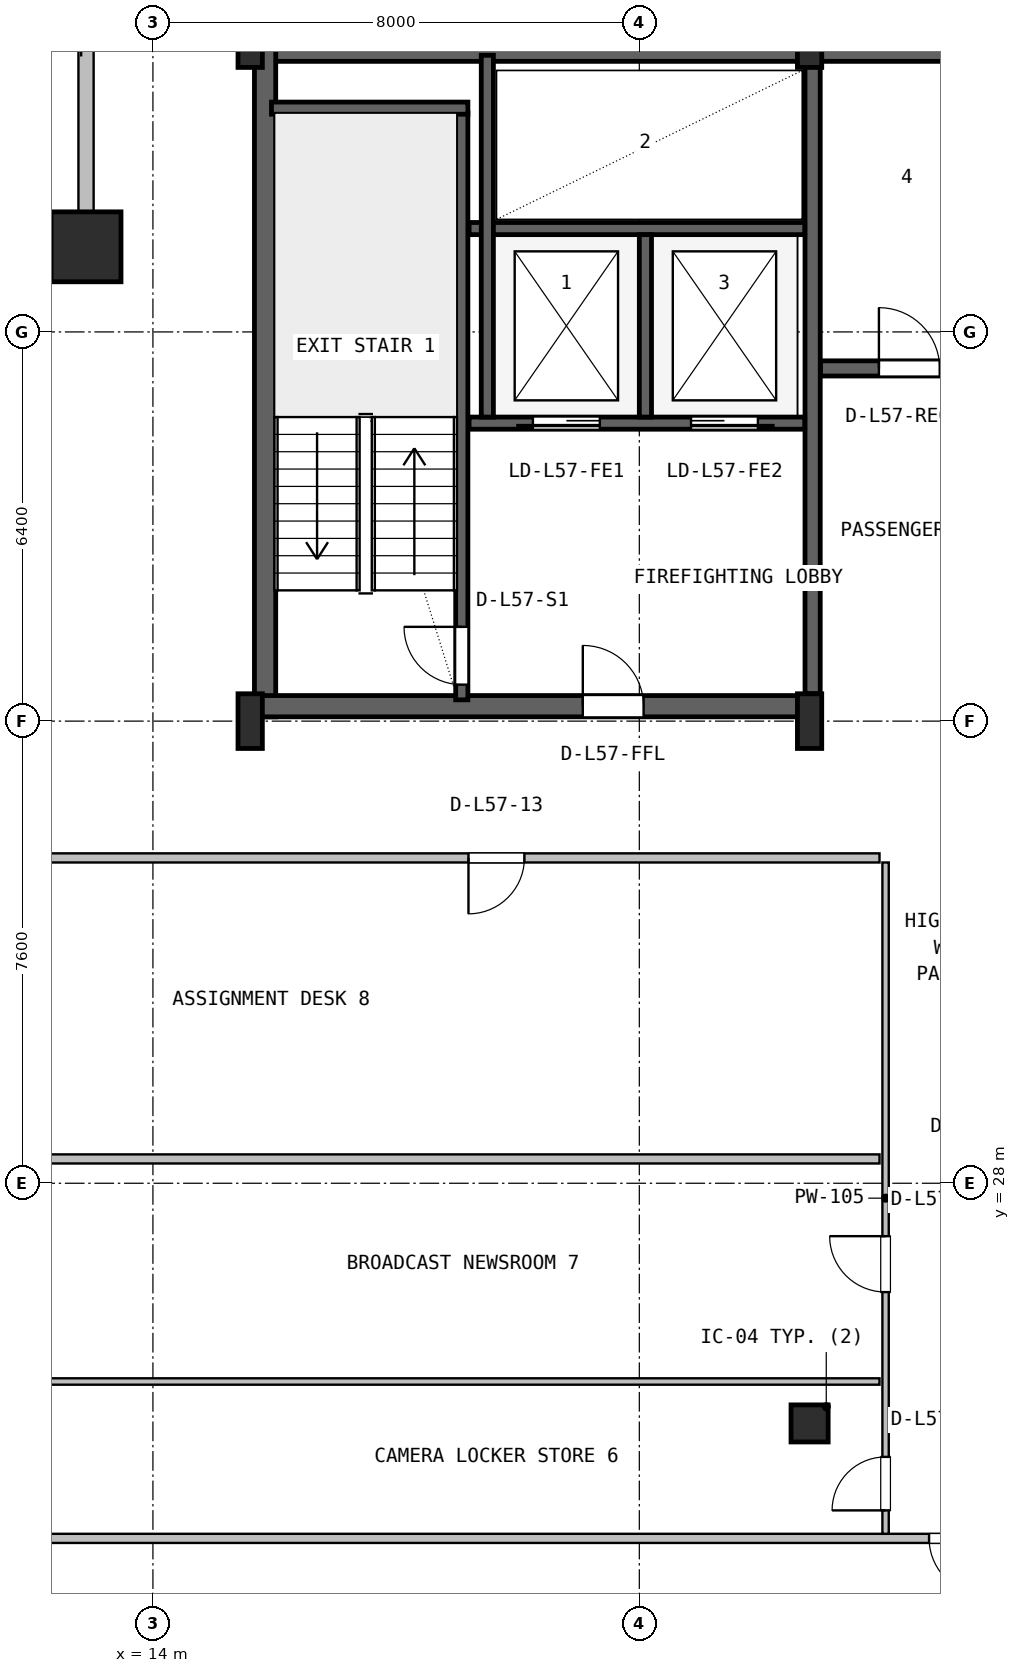
"""IFC4 building model, lengths in metres.
Left out: names, types, materials, properties, quantities, classifications, styles, units other than length and angle.
Written with IfcOpenShell. Run it as: python <this file> out.ifc"""

import sys

from ifc_helpers import new_model, si_unit, direction, frame, frame_2d, origin, origin_2d, place, context, subcontext, project, spatial, rectangle, hollow_rectangle, hollow_circle, i_section, extrude, source, transform, mapped, element, fill, save


model = new_model("IFC4")
c1 = context("Model", 3, precision=1e-05, world=origin(), true_north=direction((0.0, 1.0)))
c2 = subcontext(c1, "Body", "Model", "MODEL_VIEW")
j1 = project(units=[si_unit("LENGTHUNIT", "METRE"), si_unit("PLANEANGLEUNIT", "RADIAN")], contexts=[c1])
p1 = place(None, origin())
s1 = spatial("IfcSite", under=j1, at=p1, CompositionType="ELEMENT")
p2 = place(p1, origin())
s2 = spatial("IfcBuilding", under=s1, at=p2, CompositionType="ELEMENT")
p3 = place(p2, frame((0.0, 0.0, 230.2)))
s3 = spatial("IfcBuildingStorey", under=s2, at=p3, CompositionType="ELEMENT", Elevation=230.2)
p4 = place(p3, frame((15.6, 46.625, 0.0), z_axis=(0.0, 0.0, 1.0), x_axis=(1.0, 0.0, 0.0)))
e1 = element("IfcWall", 1, at=p4, inside=s3, PredefinedType="SHEAR", context=c2, shape_type="SweptSolid", body=[
    extrude(rectangle(XDim=36.8, YDim=0.35, at=frame_2d((18.4, 0.0))), origin(), (0.0, 0.0, 1.0), 3.48),
])
p5 = place(p3, frame((15.845, 35.67, 0.0), z_axis=(0.0, 0.0, 1.0), x_axis=(0.0, 1.0, 0.0)))
e2 = element("IfcWall", 2, at=p5, inside=s3, PredefinedType="SHEAR", context=c2, shape_type="SweptSolid", body=[
    extrude(rectangle(XDim=11.13, YDim=0.35, at=frame_2d((5.565, 0.0))), origin(), (0.0, 0.0, 1.0), 3.48),
])
p6 = place(p3, frame((15.67, 35.845, 0.0), z_axis=(0.0, 0.0, 1.0), x_axis=(1.0, 0.0, 0.0)))
e3 = element("IfcWall", 3, at=p6, inside=s3, PredefinedType="SHEAR", context=c2, shape_type="SweptSolid", body=[
    extrude(rectangle(XDim=9.13, YDim=0.35, at=frame_2d((4.565, 0.0))), origin(), (0.0, 0.0, 1.0), 3.48),
])
p7 = place(p6, frame((5.4, 0.0, 0.0)))
e4 = element("IfcOpeningElement", 4, at=p7, cuts=e3, PredefinedType="OPENING", context=c2, shape_type="SweptSolid", body=[
    extrude(rectangle(XDim=1.0, YDim=2.1, at=frame_2d((0.5, 1.05))), frame((0.0, 0.185, 0.0), z_axis=(0.0, -1.0, 0.0), x_axis=(1.0, 0.0, 0.0)), (0.0, 0.0, 1.0), 0.37),
])
m1 = source(origin(), c2, "Body", "SweptSolid", [
    extrude(i_section(OverallWidth=0.4, OverallDepth=0.9, WebThickness=0.016, FlangeThickness=0.028, FilletRadius=0.016, at=origin_2d()), origin(), (0.0, 0.0, 1.0), 3.8),
])
for number, where, z_axis, x_axis in (
    (5, (15.6, 35.6, 0.0), (0.0, 0.0, 1.0), (1.0, 0.0, 0.0)),
    (6, (15.6, 46.8, 0.0), (0.0, 0.0, 1.0), (1.0, 0.0, 0.0)),
    (7, (24.8, 35.6, 0.0), (0.0, 0.0, 1.0), (1.0, 0.0, 0.0)),
    (8, (24.8, 46.8, 0.0), (0.0, 0.0, 1.0), (1.0, 0.0, 0.0)),
):
    element("IfcColumn", number, at=place(p3, frame(where, z_axis=z_axis, x_axis=x_axis)), inside=s3, PredefinedType="COLUMN", context=c2, shape_type="MappedRepresentation", body=[
        mapped(m1, transform((0.0, 0.0, 0.0), x_axis=(1.0, 0.0, 0.0), y_axis=(0.0, 1.0, 0.0), z_axis=(0.0, 0.0, 1.0), scale=1.0)),
    ])
m2 = source(origin(), c2, "Body", "SweptSolid", [
    extrude(hollow_rectangle(XDim=1.15, YDim=1.15, WallThickness=0.045, at=origin_2d()), origin(), (0.0, 0.0, 1.0), 3.8),
])
p8 = place(p3, frame((12.9, 43.4, 0.0), z_axis=(0.0, 0.0, 1.0), x_axis=(1.0, 0.0, 0.0)))
e9 = element("IfcColumn", 9, at=p8, inside=s3, PredefinedType="COLUMN", context=c2, shape_type="MappedRepresentation", body=[
    mapped(m2, transform((0.0, 0.0, 0.0), x_axis=(1.0, 0.0, 0.0), y_axis=(0.0, 1.0, 0.0), z_axis=(0.0, 0.0, 1.0), scale=1.0)),
])
m3 = source(origin(), c2, "Body", "SweptSolid", [
    extrude(hollow_circle(Radius=0.305, WallThickness=0.025, at=origin_2d()), origin(), (0.0, 0.0, 1.0), 3.8),
])
p9 = place(p3, frame((24.8, 24.05, 0.0), z_axis=(0.0, 0.0, 1.0), x_axis=(1.0, 0.0, 0.0)))
e10 = element("IfcColumn", 10, at=p9, inside=s3, PredefinedType="COLUMN", context=c2, shape_type="MappedRepresentation", body=[
    mapped(m3, transform((0.0, 0.0, 0.0), x_axis=(1.0, 0.0, 0.0), y_axis=(0.0, 1.0, 0.0), z_axis=(0.0, 0.0, 1.0), scale=1.0)),
])
p10 = place(p3, frame((9.58, 43.4, 0.0), z_axis=(0.0, 0.0, 1.0), x_axis=(1.0, 0.0, 0.0)))
e11 = element("IfcWall", 11, at=p10, inside=s3, PredefinedType="SOLIDWALL", context=c2, shape_type="SweptSolid", body=[
    extrude(rectangle(XDim=3.19, YDim=0.25, at=frame_2d((1.595, 0.0))), origin(), (0.0, 0.0, 1.0), 3.46),
])
p11 = place(p3, frame((12.9, 43.32, 0.0), z_axis=(0.0, 0.0, 1.0), x_axis=(0.0, 1.0, 0.0)))
e12 = element("IfcWall", 12, at=p11, inside=s3, PredefinedType="SOLIDWALL", context=c2, shape_type="SweptSolid", body=[
    extrude(rectangle(XDim=3.4, YDim=0.25, at=frame_2d((1.7, 0.0))), origin(), (0.0, 0.0, 1.0), 3.101),
])
p12 = place(p3, frame((19.08, 35.95, 0.0), z_axis=(0.0, 0.0, 1.0), x_axis=(0.0, 1.0, 0.0)))
e13 = element("IfcWall", 13, at=p12, inside=s3, PredefinedType="SHEAR", context=c2, shape_type="SweptSolid", body=[
    extrude(rectangle(XDim=9.65, YDim=0.2, at=frame_2d((4.825, 0.0))), origin(), (0.0, 0.0, 1.0), 3.48),
])
p13 = place(p12, frame((0.25, 0.0, 0.0)))
e14 = element("IfcOpeningElement", 14, at=p13, cuts=e13, PredefinedType="OPENING", context=c2, shape_type="SweptSolid", body=[
    extrude(rectangle(XDim=0.95, YDim=2.1, at=frame_2d((0.475, 1.05))), frame((0.0, 0.11, 0.0), z_axis=(0.0, -1.0, 0.0), x_axis=(1.0, 0.0, 0.0)), (0.0, 0.0, 1.0), 0.22),
])
p14 = place(p3, frame((15.95, 45.68, 0.0), z_axis=(0.0, 0.0, 1.0), x_axis=(1.0, 0.0, 0.0)))
e15 = element("IfcWall", 15, at=p14, inside=s3, PredefinedType="SHEAR", context=c2, shape_type="SweptSolid", body=[
    extrude(rectangle(XDim=3.23, YDim=0.2, at=frame_2d((1.615, 0.0))), origin(), (0.0, 0.0, 1.0), 3.48),
])
p15 = place(p3, frame((24.85, 36.05, 0.0), z_axis=(0.0, 0.0, 1.0), x_axis=(0.0, 1.0, 0.0)))
e16 = element("IfcWall", 16, at=p15, inside=s3, PredefinedType="SHEAR", context=c2, shape_type="SweptSolid", body=[
    extrude(rectangle(XDim=10.45, YDim=0.25, at=frame_2d((5.225, 0.0))), origin(), (0.0, 0.0, 1.0), 3.48),
])
p16 = place(p3, frame((19.2, 40.5, 0.0), z_axis=(0.0, 0.0, 1.0), x_axis=(1.0, 0.0, 0.0)))
e17 = element("IfcWall", 17, at=p16, inside=s3, PredefinedType="SHEAR", context=c2, shape_type="SweptSolid", body=[
    extrude(rectangle(XDim=5.52, YDim=0.2, at=frame_2d((2.76, 0.0))), origin(), (0.0, 0.0, 1.0), 3.48),
])
p17 = place(p16, frame((1.05, 0.0, 0.0)))
e18 = element("IfcOpeningElement", 18, at=p17, cuts=e17, PredefinedType="OPENING", context=c2, shape_type="SweptSolid", body=[
    extrude(rectangle(XDim=1.1, YDim=2.18, at=frame_2d((0.55, 1.09))), frame((0.0, 0.11, 0.0), z_axis=(0.0, -1.0, 0.0), x_axis=(1.0, 0.0, 0.0)), (0.0, 0.0, 1.0), 0.22),
])
p18 = place(p16, frame((3.65, 0.0, 0.0)))
e19 = element("IfcOpeningElement", 19, at=p18, cuts=e17, PredefinedType="OPENING", context=c2, shape_type="SweptSolid", body=[
    extrude(rectangle(XDim=1.1, YDim=2.18, at=frame_2d((0.55, 1.09))), frame((0.0, 0.11, 0.0), z_axis=(0.0, -1.0, 0.0), x_axis=(1.0, 0.0, 0.0)), (0.0, 0.0, 1.0), 0.22),
])
p19 = place(p3, frame((19.2, 43.7, 0.0), z_axis=(0.0, 0.0, 1.0), x_axis=(1.0, 0.0, 0.0)))
e20 = element("IfcWall", 20, at=p19, inside=s3, PredefinedType="SHEAR", context=c2, shape_type="SweptSolid", body=[
    extrude(rectangle(XDim=5.52, YDim=0.2, at=frame_2d((2.76, 0.0))), origin(), (0.0, 0.0, 1.0), 3.48),
])
p20 = place(p3, frame((22.1, 40.6, 0.0), z_axis=(0.0, 0.0, 1.0), x_axis=(0.0, 1.0, 0.0)))
e21 = element("IfcWall", 21, at=p20, inside=s3, PredefinedType="SHEAR", context=c2, shape_type="SweptSolid", body=[
    extrude(rectangle(XDim=3.0, YDim=0.2, at=frame_2d((1.5, 0.0))), origin(), (0.0, 0.0, 1.0), 3.48),
])
p21 = place(p3, frame((19.5, 40.6, 0.0), z_axis=(0.0, 0.0, 1.0), x_axis=(0.0, 1.0, 0.0)))
e22 = element("IfcWall", 22, at=p21, inside=s3, PredefinedType="SHEAR", context=c2, shape_type="SweptSolid", body=[
    extrude(rectangle(XDim=5.95, YDim=0.2, at=frame_2d((2.975, 0.0))), origin(), (0.0, 0.0, 1.0), 3.48),
])
p22 = place(p3, frame((24.98, 41.4, 0.0), z_axis=(0.0, 0.0, 1.0), x_axis=(1.0, 0.0, 0.0)))
e23 = element("IfcWall", 23, at=p22, inside=s3, PredefinedType="SHEAR", context=c2, shape_type="SweptSolid", body=[
    extrude(rectangle(XDim=23.82, YDim=0.25, at=frame_2d((11.91, 0.0))), origin(), (0.0, 0.0, 1.0), 3.48),
])
p23 = place(p22, frame((16.87, 0.0, 0.0)))
e24 = element("IfcOpeningElement", 24, at=p23, cuts=e23, PredefinedType="OPENING", context=c2, shape_type="SweptSolid", body=[
    extrude(rectangle(XDim=1.1, YDim=2.18, at=frame_2d((0.55, 1.09))), frame((0.0, 0.135, 0.0), z_axis=(0.0, -1.0, 0.0), x_axis=(1.0, 0.0, 0.0)), (0.0, 0.0, 1.0), 0.27),
])
p24 = place(p22, frame((19.47, 0.0, 0.0)))
e25 = element("IfcOpeningElement", 25, at=p24, cuts=e23, PredefinedType="OPENING", context=c2, shape_type="SweptSolid", body=[
    extrude(rectangle(XDim=1.1, YDim=2.18, at=frame_2d((0.55, 1.09))), frame((0.0, 0.135, 0.0), z_axis=(0.0, -1.0, 0.0), x_axis=(1.0, 0.0, 0.0)), (0.0, 0.0, 1.0), 0.27),
])
p25 = place(p22, frame((22.07, 0.0, 0.0)))
e26 = element("IfcOpeningElement", 26, at=p25, cuts=e23, PredefinedType="OPENING", context=c2, shape_type="SweptSolid", body=[
    extrude(rectangle(XDim=1.1, YDim=2.18, at=frame_2d((0.55, 1.09))), frame((0.0, 0.135, 0.0), z_axis=(0.0, -1.0, 0.0), x_axis=(1.0, 0.0, 0.0)), (0.0, 0.0, 1.0), 0.27),
])
p26 = place(p22, frame((0.96, 0.0, 0.0)))
e27 = element("IfcOpeningElement", 27, at=p26, cuts=e23, PredefinedType="OPENING", context=c2, shape_type="SweptSolid", body=[
    extrude(rectangle(XDim=1.0, YDim=2.08, at=frame_2d((0.5, 1.04))), frame((0.0, 0.135, 0.0), z_axis=(0.0, -1.0, 0.0), x_axis=(1.0, 0.0, 0.0)), (0.0, 0.0, 1.0), 0.27),
])
p27 = place(p22, frame((3.56, 0.0, 0.0)))
e28 = element("IfcOpeningElement", 28, at=p27, cuts=e23, PredefinedType="OPENING", context=c2, shape_type="SweptSolid", body=[
    extrude(rectangle(XDim=1.0, YDim=2.08, at=frame_2d((0.5, 1.04))), frame((0.0, 0.135, 0.0), z_axis=(0.0, -1.0, 0.0), x_axis=(1.0, 0.0, 0.0)), (0.0, 0.0, 1.0), 0.27),
])
p28 = place(p22, frame((6.16, 0.0, 0.0)))
e29 = element("IfcOpeningElement", 29, at=p28, cuts=e23, PredefinedType="OPENING", context=c2, shape_type="SweptSolid", body=[
    extrude(rectangle(XDim=0.92, YDim=2.08, at=frame_2d((0.46, 1.04))), frame((0.0, 0.135, 0.0), z_axis=(0.0, -1.0, 0.0), x_axis=(1.0, 0.0, 0.0)), (0.0, 0.0, 1.0), 0.27),
])
p29 = place(p22, frame((11.56, 0.0, 0.0)))
e30 = element("IfcOpeningElement", 30, at=p29, cuts=e23, PredefinedType="OPENING", context=c2, shape_type="SweptSolid", body=[
    extrude(rectangle(XDim=1.0, YDim=2.08, at=frame_2d((0.5, 1.04))), frame((0.0, 0.135, 0.0), z_axis=(0.0, -1.0, 0.0), x_axis=(1.0, 0.0, 0.0)), (0.0, 0.0, 1.0), 0.27),
])
p30 = place(p3, frame((9.68, 22.16, 0.0), z_axis=(0.0, 0.0, 1.0), x_axis=(1.0, 0.0, 0.0)))
e31 = element("IfcWall", 31, at=p30, inside=s3, PredefinedType="PARTITIONING", context=c2, shape_type="SweptSolid", body=[
    extrude(rectangle(XDim=48.64, YDim=0.15, at=frame_2d((24.32, 0.0))), origin(), (0.0, 0.0, 1.0), 2.838),
])
p31 = place(p30, frame((17.085, 0.0, 0.0)))
e32 = element("IfcOpeningElement", 32, at=p31, cuts=e31, PredefinedType="OPENING", context=c2, shape_type="SweptSolid", body=[
    extrude(rectangle(XDim=0.92, YDim=2.08, at=frame_2d((0.46, 1.04))), frame((0.0, 0.085, 0.0), z_axis=(0.0, -1.0, 0.0), x_axis=(1.0, 0.0, 0.0)), (0.0, 0.0, 1.0), 0.17),
])
p32 = place(p30, frame((20.225, 0.0, 0.0)))
e33 = element("IfcOpeningElement", 33, at=p32, cuts=e31, PredefinedType="OPENING", context=c2, shape_type="SweptSolid", body=[
    extrude(rectangle(XDim=0.92, YDim=2.08, at=frame_2d((0.46, 1.04))), frame((0.0, 0.085, 0.0), z_axis=(0.0, -1.0, 0.0), x_axis=(1.0, 0.0, 0.0)), (0.0, 0.0, 1.0), 0.17),
])
p33 = place(p30, frame((24.57, 0.0, 0.0)))
e34 = element("IfcOpeningElement", 34, at=p33, cuts=e31, PredefinedType="OPENING", context=c2, shape_type="SweptSolid", body=[
    extrude(rectangle(XDim=1.05, YDim=2.1, at=frame_2d((0.525, 1.05))), frame((0.0, 0.085, 0.0), z_axis=(0.0, -1.0, 0.0), x_axis=(1.0, 0.0, 0.0)), (0.0, 0.0, 1.0), 0.17),
])
p34 = place(p30, frame((28.54, 0.0, 0.0)))
e35 = element("IfcOpeningElement", 35, at=p34, cuts=e31, PredefinedType="OPENING", context=c2, shape_type="SweptSolid", body=[
    extrude(rectangle(XDim=0.88, YDim=2.06, at=frame_2d((0.44, 1.03))), frame((0.0, 0.085, 0.0), z_axis=(0.0, -1.0, 0.0), x_axis=(1.0, 0.0, 0.0)), (0.0, 0.0, 1.0), 0.17),
])
p35 = place(p30, frame((31.095, 0.0, 0.0)))
e36 = element("IfcOpeningElement", 36, at=p35, cuts=e31, PredefinedType="OPENING", context=c2, shape_type="SweptSolid", body=[
    extrude(rectangle(XDim=1.0, YDim=2.1, at=frame_2d((0.5, 1.05))), frame((0.0, 0.085, 0.0), z_axis=(0.0, -1.0, 0.0), x_axis=(1.0, 0.0, 0.0)), (0.0, 0.0, 1.0), 0.17),
])
p36 = place(p3, frame((26.05, 22.235, 0.0), z_axis=(0.0, 0.0, 1.0), x_axis=(0.0, 1.0, 0.0)))
e37 = element("IfcWall", 37, at=p36, inside=s3, PredefinedType="PARTITIONING", context=c2, shape_type="SweptSolid", body=[
    extrude(rectangle(XDim=11.04, YDim=0.105, at=frame_2d((5.52, 0.0))), origin(), (0.0, 0.0, 1.0), 2.838),
])
p37 = place(p36, frame((0.385, 0.0, 0.0)))
e38 = element("IfcOpeningElement", 38, at=p37, cuts=e37, PredefinedType="OPENING", context=c2, shape_type="SweptSolid", body=[
    extrude(rectangle(XDim=0.88, YDim=2.06, at=frame_2d((0.44, 1.03))), frame((0.0, 0.062, 0.0), z_axis=(0.0, -1.0, 0.0), x_axis=(1.0, 0.0, 0.0)), (0.0, 0.0, 1.0), 0.125),
])
p38 = place(p36, frame((3.975, 0.0, 0.0)))
e39 = element("IfcOpeningElement", 39, at=p38, cuts=e37, PredefinedType="OPENING", context=c2, shape_type="SweptSolid", body=[
    extrude(rectangle(XDim=0.92, YDim=2.08, at=frame_2d((0.46, 1.04))), frame((0.0, 0.062, 0.0), z_axis=(0.0, -1.0, 0.0), x_axis=(1.0, 0.0, 0.0)), (0.0, 0.0, 1.0), 0.125),
])
p39 = place(p3, frame((9.68, 24.74, 0.0), z_axis=(0.0, 0.0, 1.0), x_axis=(1.0, 0.0, 0.0)))
e40 = element("IfcWall", 40, at=p39, inside=s3, PredefinedType="PARTITIONING", context=c2, shape_type="SweptSolid", body=[
    extrude(rectangle(XDim=16.27, YDim=0.105, at=frame_2d((8.135, 0.0))), origin(), (0.0, 0.0, 1.0), 2.838),
])
p40 = place(p3, frame((9.68, 28.4, 0.0), z_axis=(0.0, 0.0, 1.0), x_axis=(1.0, 0.0, 0.0)))
e41 = element("IfcWall", 41, at=p40, inside=s3, PredefinedType="PARTITIONING", context=c2, shape_type="SweptSolid", body=[
    extrude(rectangle(XDim=16.27, YDim=0.15, at=frame_2d((8.135, 0.0))), origin(), (0.0, 0.0, 1.0), 2.838),
])
p41 = place(p3, frame((9.68, 33.35, 0.0), z_axis=(0.0, 0.0, 1.0), x_axis=(1.0, 0.0, 0.0)))
e42 = element("IfcWall", 42, at=p41, inside=s3, PredefinedType="PARTITIONING", context=c2, shape_type="SweptSolid", body=[
    extrude(rectangle(XDim=16.27, YDim=0.15, at=frame_2d((8.135, 0.0))), origin(), (0.0, 0.0, 1.0), 2.838),
])
p42 = place(p41, frame((9.51, 0.0, 0.0)))
e43 = element("IfcOpeningElement", 43, at=p42, cuts=e42, PredefinedType="OPENING", context=c2, shape_type="SweptSolid", body=[
    extrude(rectangle(XDim=0.92, YDim=2.08, at=frame_2d((0.46, 1.04))), frame((0.0, 0.085, 0.0), z_axis=(0.0, -1.0, 0.0), x_axis=(1.0, 0.0, 0.0)), (0.0, 0.0, 1.0), 0.17),
])
m4 = source(origin(), c2, "Body", "SweptSolid", [
    extrude(rectangle(XDim=0.95, YDim=2.1, at=frame_2d((0.475, 1.05))), frame((0.0, 0.025, 0.0), z_axis=(0.0, -1.0, 0.0), x_axis=(1.0, 0.0, 0.0)), (0.0, 0.0, 1.0), 0.05),
])
p43 = place(p13, origin())
e44 = element("IfcDoor", 44, at=p43, inside=s3, OperationType="SINGLE_SWING_RIGHT", PredefinedType="DOOR", context=c2, shape_type="MappedRepresentation", body=[
    mapped(m4, transform((0.0, 0.0, 0.0), x_axis=(1.0, 0.0, 0.0), y_axis=(0.0, 1.0, 0.0), z_axis=(0.0, 0.0, 1.0), scale=1.0)),
])
fill(e14, e44)
m5 = source(origin(), c2, "Body", "SweptSolid", [
    extrude(rectangle(XDim=1.0, YDim=2.1, at=frame_2d((0.5, 1.05))), frame((0.0, 0.025, 0.0), z_axis=(0.0, -1.0, 0.0), x_axis=(1.0, 0.0, 0.0)), (0.0, 0.0, 1.0), 0.05),
])
p44 = place(p7, origin())
e45 = element("IfcDoor", 45, at=p44, inside=s3, OperationType="SINGLE_SWING_LEFT", PredefinedType="DOOR", context=c2, shape_type="MappedRepresentation", body=[
    mapped(m5, transform((0.0, 0.0, 0.0), x_axis=(1.0, 0.0, 0.0), y_axis=(0.0, 1.0, 0.0), z_axis=(0.0, 0.0, 1.0), scale=1.0)),
])
fill(e4, e45)
m6 = source(origin(), c2, "Body", "SweptSolid", [
    extrude(rectangle(XDim=1.1, YDim=2.18, at=frame_2d((0.55, 1.09))), frame((0.0, 0.025, 0.0), z_axis=(0.0, -1.0, 0.0), x_axis=(1.0, 0.0, 0.0)), (0.0, 0.0, 1.0), 0.05),
])
p45 = place(p17, frame((1.1, 0.0, 0.0), z_axis=(0.0, 0.0, 1.0), x_axis=(-1.0, 0.0, 0.0)))
e46 = element("IfcDoor", 46, at=p45, inside=s3, OperationType="SLIDING_TO_LEFT", PredefinedType="DOOR", context=c2, shape_type="MappedRepresentation", body=[
    mapped(m6, transform((0.0, 0.0, 0.0), x_axis=(1.0, 0.0, 0.0), y_axis=(0.0, 1.0, 0.0), z_axis=(0.0, 0.0, 1.0), scale=1.0)),
])
fill(e18, e46)
p46 = place(p18, frame((1.1, 0.0, 0.0), z_axis=(0.0, 0.0, 1.0), x_axis=(-1.0, 0.0, 0.0)))
e47 = element("IfcDoor", 47, at=p46, inside=s3, OperationType="SLIDING_TO_RIGHT", PredefinedType="DOOR", context=c2, shape_type="MappedRepresentation", body=[
    mapped(m6, transform((0.0, 0.0, 0.0), x_axis=(1.0, 0.0, 0.0), y_axis=(0.0, 1.0, 0.0), z_axis=(0.0, 0.0, 1.0), scale=1.0)),
])
fill(e19, e47)
m7 = source(origin(), c2, "Body", "SweptSolid", [
    extrude(rectangle(XDim=1.0, YDim=2.08, at=frame_2d((0.5, 1.04))), frame((0.0, 0.025, 0.0), z_axis=(0.0, -1.0, 0.0), x_axis=(1.0, 0.0, 0.0)), (0.0, 0.0, 1.0), 0.05),
])
p47 = place(p26, origin())
e48 = element("IfcDoor", 48, at=p47, inside=s3, OperationType="SINGLE_SWING_LEFT", PredefinedType="DOOR", context=c2, shape_type="MappedRepresentation", body=[
    mapped(m7, transform((0.0, 0.0, 0.0), x_axis=(1.0, 0.0, 0.0), y_axis=(0.0, 1.0, 0.0), z_axis=(0.0, 0.0, 1.0), scale=1.0)),
])
fill(e27, e48)
m8 = source(origin(), c2, "Body", "SweptSolid", [
    extrude(rectangle(XDim=0.92, YDim=2.08, at=frame_2d((0.46, 1.04))), frame((0.0, 0.025, 0.0), z_axis=(0.0, -1.0, 0.0), x_axis=(1.0, 0.0, 0.0)), (0.0, 0.0, 1.0), 0.05),
])
p48 = place(p31, frame((0.92, 0.0, 0.0), z_axis=(0.0, 0.0, 1.0), x_axis=(-1.0, 0.0, 0.0)))
e49 = element("IfcDoor", 49, at=p48, inside=s3, OperationType="SINGLE_SWING_RIGHT", PredefinedType="DOOR", context=c2, shape_type="MappedRepresentation", body=[
    mapped(m8, transform((0.0, 0.0, 0.0), x_axis=(1.0, 0.0, 0.0), y_axis=(0.0, 1.0, 0.0), z_axis=(0.0, 0.0, 1.0), scale=1.0)),
])
fill(e32, e49)
m9 = source(origin(), c2, "Body", "SweptSolid", [
    extrude(rectangle(XDim=0.88, YDim=2.06, at=frame_2d((0.44, 1.03))), frame((0.0, 0.025, 0.0), z_axis=(0.0, -1.0, 0.0), x_axis=(1.0, 0.0, 0.0)), (0.0, 0.0, 1.0), 0.05),
])
p49 = place(p37, origin())
e50 = element("IfcDoor", 50, at=p49, inside=s3, OperationType="SINGLE_SWING_LEFT", PredefinedType="DOOR", context=c2, shape_type="MappedRepresentation", body=[
    mapped(m9, transform((0.0, 0.0, 0.0), x_axis=(1.0, 0.0, 0.0), y_axis=(0.0, 1.0, 0.0), z_axis=(0.0, 0.0, 1.0), scale=1.0)),
])
fill(e38, e50)
p50 = place(p38, origin())
e51 = element("IfcDoor", 51, at=p50, inside=s3, OperationType="SINGLE_SWING_RIGHT", PredefinedType="DOOR", context=c2, shape_type="MappedRepresentation", body=[
    mapped(m8, transform((0.0, 0.0, 0.0), x_axis=(1.0, 0.0, 0.0), y_axis=(0.0, 1.0, 0.0), z_axis=(0.0, 0.0, 1.0), scale=1.0)),
])
fill(e39, e51)
p51 = place(p42, frame((0.92, 0.0, 0.0), z_axis=(0.0, 0.0, 1.0), x_axis=(-1.0, 0.0, 0.0)))
e52 = element("IfcDoor", 52, at=p51, inside=s3, OperationType="SINGLE_SWING_LEFT", PredefinedType="DOOR", context=c2, shape_type="MappedRepresentation", body=[
    mapped(m8, transform((0.0, 0.0, 0.0), x_axis=(1.0, 0.0, 0.0), y_axis=(0.0, 1.0, 0.0), z_axis=(0.0, 0.0, 1.0), scale=1.0)),
])
fill(e43, e52)
save(model, sys.argv[1])
